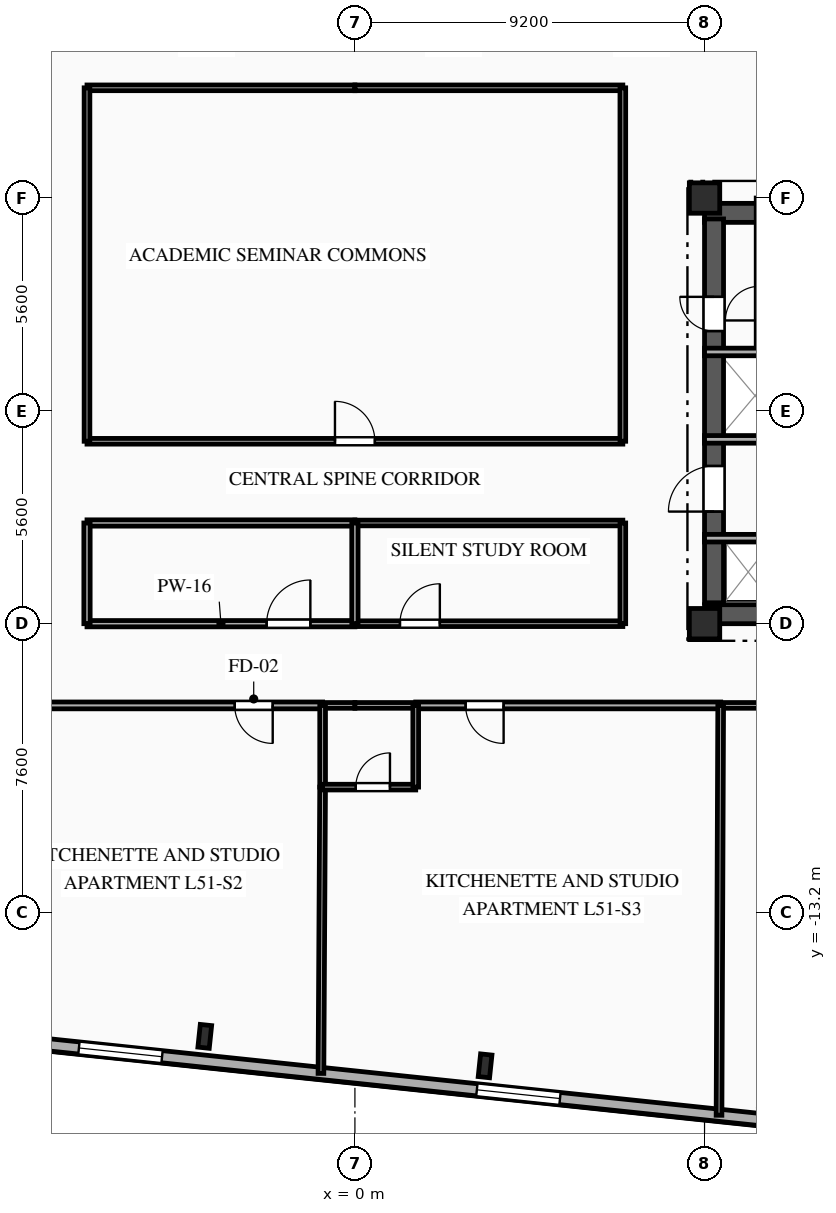
"""IFC4 building model, lengths in metres.
Left out: names, types, materials, properties, quantities, classifications, styles, units other than length and angle.
Written with IfcOpenShell. Run it as: python <this file> out.ifc"""

import sys

from ifc_helpers import new_model, si_unit, direction, frame, frame_2d, origin, origin_2d, place, context, subcontext, project, spatial, rectangle, i_section, extrude, element, fill, save


model = new_model("IFC4")
c1 = context("Model", 3, precision=1e-05, world=origin(), true_north=direction((0.0, 1.0)))
c2 = subcontext(c1, "Body", "Model", "MODEL_VIEW")
j1 = project(units=[si_unit("LENGTHUNIT", "METRE"), si_unit("PLANEANGLEUNIT", "RADIAN")], contexts=[c1])
p1 = place(None, origin())
s1 = spatial("IfcSite", under=j1, at=p1, CompositionType="ELEMENT")
p2 = place(p1, origin())
s2 = spatial("IfcBuilding", under=s1, at=p2, CompositionType="ELEMENT")
p3 = place(p2, frame((0.0, 0.0, 183.0)))
s3 = spatial("IfcBuildingStorey", under=s2, at=p3, CompositionType="ELEMENT", Elevation=183.0)
for number, where, z_axis, x_axis in (
    (1, (9.2, -5.6, 0.0), (0.0, 0.0, 1.0), (1.0, 0.0, 0.0)),
    (2, (9.2, 5.6, 0.0), (0.0, 0.0, 1.0), (1.0, 0.0, 0.0)),
):
    element("IfcColumn", number, at=place(p3, frame(where, z_axis=z_axis, x_axis=x_axis)), inside=s3, PredefinedType="COLUMN", context=c2, shape_type="SweptSolid", body=[
        extrude(rectangle(XDim=0.8, YDim=0.8, at=origin_2d()), origin(), (0.0, 0.0, 1.0), 3.35),
    ])
for number, where, z_axis, x_axis in (
    (3, (-3.951, -16.458, 0.0), (0.0, 0.0, 1.0), (0.995, -0.105, 0.0)),
    (4, (3.425, -17.233, 0.0), (0.0, 0.0, 1.0), (0.995, -0.105, 0.0)),
):
    element("IfcColumn", number, at=place(p3, frame(where, z_axis=z_axis, x_axis=x_axis)), inside=s3, PredefinedType="COLUMN", context=c2, shape_type="SweptSolid", body=[
        extrude(i_section(OverallWidth=0.3, OverallDepth=0.6, WebThickness=0.015, FlangeThickness=0.03, FilletRadius=0.027, at=origin_2d()), origin(), (0.0, 0.0, 1.0), 3.35),
    ])
p4 = place(p3, frame((18.756, -19.498, 0.0), z_axis=(0.0, 0.0, 1.0), x_axis=(-0.994522060044, 0.104526896475, 0.0)))
e5 = element("IfcWall", 5, at=p4, inside=s3, PredefinedType="SOLIDWALL", context=c2, shape_type="SweptSolid", body=[
    extrude(rectangle(XDim=45.8, YDim=0.32, at=frame_2d((22.9, 0.0))), origin(), (0.0, 0.0, 1.0), 3.04),
])
p5 = place(p4, frame((1.217, 0.0, 0.85)))
e6 = element("IfcOpeningElement", 6, at=p5, cuts=e5, PredefinedType="OPENING", context=c2, shape_type="SweptSolid", body=[
    extrude(rectangle(XDim=1.65, YDim=1.85, at=frame_2d((0.825, 0.925))), frame((0.0, 0.17, 0.0), z_axis=(0.0, -1.0, 0.0), x_axis=(1.0, 0.0, 0.0)), (0.0, 0.0, 1.0), 0.34),
])
p6 = place(p4, frame((5.621, 0.0, 0.85)))
e7 = element("IfcOpeningElement", 7, at=p6, cuts=e5, PredefinedType="OPENING", context=c2, shape_type="SweptSolid", body=[
    extrude(rectangle(XDim=1.65, YDim=1.85, at=frame_2d((0.825, 0.925))), frame((0.0, 0.17, 0.0), z_axis=(0.0, -1.0, 0.0), x_axis=(1.0, 0.0, 0.0)), (0.0, 0.0, 1.0), 0.34),
])
p7 = place(p4, frame((13.433, 0.0, 0.85)))
e8 = element("IfcOpeningElement", 8, at=p7, cuts=e5, PredefinedType="OPENING", context=c2, shape_type="SweptSolid", body=[
    extrude(rectangle(XDim=2.2, YDim=1.85, at=frame_2d((1.1, 0.925))), frame((0.0, 0.17, 0.0), z_axis=(0.0, -1.0, 0.0), x_axis=(1.0, 0.0, 0.0)), (0.0, 0.0, 1.0), 0.34),
])
p8 = place(p4, frame((23.962, 0.0, 0.85)))
e9 = element("IfcOpeningElement", 9, at=p8, cuts=e5, PredefinedType="OPENING", context=c2, shape_type="SweptSolid", body=[
    extrude(rectangle(XDim=2.2, YDim=1.85, at=frame_2d((1.1, 0.925))), frame((0.0, 0.17, 0.0), z_axis=(0.0, -1.0, 0.0), x_axis=(1.0, 0.0, 0.0)), (0.0, 0.0, 1.0), 0.34),
])
p9 = place(p4, frame((34.366, 0.0, 0.85)))
e10 = element("IfcOpeningElement", 10, at=p9, cuts=e5, PredefinedType="OPENING", context=c2, shape_type="SweptSolid", body=[
    extrude(rectangle(XDim=1.65, YDim=1.85, at=frame_2d((0.825, 0.925))), frame((0.0, 0.17, 0.0), z_axis=(0.0, -1.0, 0.0), x_axis=(1.0, 0.0, 0.0)), (0.0, 0.0, 1.0), 0.34),
])
p10 = place(p4, frame((41.892, 0.0, 0.85)))
e11 = element("IfcOpeningElement", 11, at=p10, cuts=e5, PredefinedType="OPENING", context=c2, shape_type="SweptSolid", body=[
    extrude(rectangle(XDim=1.65, YDim=1.85, at=frame_2d((0.825, 0.925))), frame((0.0, 0.17, 0.0), z_axis=(0.0, -1.0, 0.0), x_axis=(1.0, 0.0, 0.0)), (0.0, 0.0, 1.0), 0.34),
])
p11 = place(p3, frame((9.2, 5.21, 0.0), z_axis=(0.0, 0.0, 1.0), x_axis=(1.0, 0.0, 0.0)))
e12 = element("IfcWall", 12, at=p11, inside=s3, PredefinedType="SHEAR", context=c2, shape_type="SweptSolid", body=[
    extrude(rectangle(XDim=9.6, YDim=0.5, at=frame_2d((4.8, 0.0))), origin(), (0.0, 0.0, 1.0), 3.04),
])
p12 = place(p11, frame((6.95, 0.0, 0.0)))
e13 = element("IfcOpeningElement", 13, at=p12, cuts=e12, PredefinedType="OPENING", context=c2, shape_type="SweptSolid", body=[
    extrude(rectangle(XDim=1.1, YDim=2.15, at=frame_2d((0.55, 1.075))), frame((0.0, 0.26, 0.0), z_axis=(0.0, -1.0, 0.0), x_axis=(1.0, 0.0, 0.0)), (0.0, 0.0, 1.0), 0.52),
])
p13 = place(p11, frame((3.775, 0.0, 0.0)))
e14 = element("IfcOpeningElement", 14, at=p13, cuts=e12, PredefinedType="OPENING", context=c2, shape_type="SweptSolid", body=[
    extrude(rectangle(XDim=1.05, YDim=2.1, at=frame_2d((0.525, 1.05))), frame((0.0, 0.26, 0.0), z_axis=(0.0, -1.0, 0.0), x_axis=(1.0, 0.0, 0.0)), (0.0, 0.0, 1.0), 0.52),
])
p14 = place(p3, frame((9.2, -5.35, 0.0), z_axis=(0.0, 0.0, 1.0), x_axis=(1.0, 0.0, 0.0)))
e15 = element("IfcWall", 15, at=p14, inside=s3, PredefinedType="SHEAR", context=c2, shape_type="SweptSolid", body=[
    extrude(rectangle(XDim=9.6, YDim=0.5, at=frame_2d((4.8, 0.0))), origin(), (0.0, 0.0, 1.0), 3.04),
])
p15 = place(p14, frame((7.65, 0.0, 0.0)))
e16 = element("IfcOpeningElement", 16, at=p15, cuts=e15, PredefinedType="OPENING", context=c2, shape_type="SweptSolid", body=[
    extrude(rectangle(XDim=0.9, YDim=2.1, at=frame_2d((0.45, 1.05))), frame((0.0, 0.26, 0.0), z_axis=(0.0, -1.0, 0.0), x_axis=(1.0, 0.0, 0.0)), (0.0, 0.0, 1.0), 0.52),
])
p16 = place(p3, frame((9.45, -5.05, 0.0), z_axis=(0.0, 0.0, 1.0), x_axis=(0.0, 1.0, 0.0)))
e17 = element("IfcWall", 17, at=p16, inside=s3, PredefinedType="SHEAR", context=c2, shape_type="SweptSolid", body=[
    extrude(rectangle(XDim=10.1, YDim=0.5, at=frame_2d((5.05, 0.0))), origin(), (0.0, 0.0, 1.0), 3.04),
])
p17 = place(p16, frame((7.15, 0.0, 0.0)))
e18 = element("IfcOpeningElement", 18, at=p17, cuts=e17, PredefinedType="OPENING", context=c2, shape_type="SweptSolid", body=[
    extrude(rectangle(XDim=0.9, YDim=2.1, at=frame_2d((0.45, 1.05))), frame((0.0, 0.26, 0.0), z_axis=(0.0, -1.0, 0.0), x_axis=(1.0, 0.0, 0.0)), (0.0, 0.0, 1.0), 0.52),
])
p18 = place(p16, frame((2.4, 0.0, 0.0)))
e19 = element("IfcOpeningElement", 19, at=p18, cuts=e17, PredefinedType="OPENING", context=c2, shape_type="SweptSolid", body=[
    extrude(rectangle(XDim=1.2, YDim=2.15, at=frame_2d((0.6, 1.075))), frame((0.0, 0.26, 0.0), z_axis=(0.0, -1.0, 0.0), x_axis=(1.0, 0.0, 0.0)), (0.0, 0.0, 1.0), 0.52),
])
p19 = place(p3, frame((9.2, -3.35, 0.0), z_axis=(0.0, 0.0, 1.0), x_axis=(1.0, 0.0, 0.0)))
e20 = element("IfcWall", 20, at=p19, inside=s3, PredefinedType="PARTITIONING", context=c2, shape_type="SweptSolid", body=[
    extrude(rectangle(XDim=1.88, YDim=0.2, at=frame_2d((0.94, 0.0))), origin(), (0.0, 0.0, 1.0), 2.755),
])
p20 = place(p3, frame((11.46, -0.75, 0.0), z_axis=(0.0, 0.0, 1.0), x_axis=(-1.0, 0.0, 0.0)))
e21 = element("IfcWall", 21, at=p20, inside=s3, PredefinedType="PARTITIONING", context=c2, shape_type="SweptSolid", body=[
    extrude(rectangle(XDim=2.26, YDim=0.2, at=frame_2d((1.13, 0.0))), origin(), (0.0, 0.0, 1.0), 3.04),
])
for number, where, z_axis, x_axis in (
    (22, (0.0, 8.5, 0.0), (0.0, 0.0, 1.0), (-1.0, 0.0, 0.0)),
    (23, (7.05, 8.5, 0.0), (0.0, 0.0, 1.0), (-1.0, 0.0, 0.0)),
):
    element("IfcWall", number, at=place(p3, frame(where, z_axis=z_axis, x_axis=x_axis)), inside=s3, PredefinedType="PARTITIONING", context=c2, shape_type="SweptSolid", body=[
        extrude(rectangle(XDim=7.05, YDim=0.15, at=frame_2d((3.525, 0.0))), origin(), (0.0, 0.0, 1.0), 3.04),
    ])
p21 = place(p3, frame((-0.85, -7.75, 0.0), z_axis=(0.0, 0.0, 1.0), x_axis=(-1.0, 0.0, 0.0)))
e24 = element("IfcWall", 24, at=p21, inside=s3, PredefinedType="PARTITIONING", context=c2, shape_type="SweptSolid", body=[
    extrude(rectangle(XDim=8.025, YDim=0.18, at=frame_2d((4.012, 0.0))), origin(), (0.0, 0.0, 1.0), 3.04),
])
p22 = place(p21, frame((1.313, 0.0, 0.0)))
e25 = element("IfcOpeningElement", 25, at=p22, cuts=e24, PredefinedType="OPENING", context=c2, shape_type="SweptSolid", body=[
    extrude(rectangle(XDim=1.0, YDim=2.15, at=frame_2d((0.5, 1.075))), frame((0.0, 0.1, 0.0), z_axis=(0.0, -1.0, 0.0), x_axis=(1.0, 0.0, 0.0)), (0.0, 0.0, 1.0), 0.2),
])
p23 = place(p3, frame((0.0, -7.75, 0.0), z_axis=(0.0, 0.0, 1.0), x_axis=(-1.0, 0.0, 0.0)))
e26 = element("IfcWall", 26, at=p23, inside=s3, PredefinedType="PLUMBINGWALL", context=c2, shape_type="SweptSolid", body=[
    extrude(rectangle(XDim=0.85, YDim=0.15, at=frame_2d((0.425, 0.0))), origin(), (0.0, 0.0, 1.0), 3.04),
])
p24 = place(p3, frame((-7.05, -5.6, 0.0), z_axis=(0.0, 0.0, 1.0), x_axis=(1.0, 0.0, 0.0)))
e27 = element("IfcWall", 27, at=p24, inside=s3, PredefinedType="PARTITIONING", context=c2, shape_type="SweptSolid", body=[
    extrude(rectangle(XDim=7.05, YDim=0.165, at=frame_2d((3.525, 0.0))), origin(), (0.0, 0.0, 1.0), 2.525),
])
p25 = place(p24, frame((4.728, 0.0, 0.0)))
e28 = element("IfcOpeningElement", 28, at=p25, cuts=e27, PredefinedType="OPENING", context=c2, shape_type="SweptSolid", body=[
    extrude(rectangle(XDim=1.15, YDim=2.15, at=frame_2d((0.575, 1.075))), frame((0.0, 0.093, 0.0), z_axis=(0.0, -1.0, 0.0), x_axis=(1.0, 0.0, 0.0)), (0.0, 0.0, 1.0), 0.185),
])
p26 = place(p3, frame((9.625, -7.75, 0.0), z_axis=(0.0, 0.0, 1.0), x_axis=(-1.0, 0.0, 0.0)))
e29 = element("IfcWall", 29, at=p26, inside=s3, PredefinedType="PARTITIONING", context=c2, shape_type="SweptSolid", body=[
    extrude(rectangle(XDim=8.025, YDim=0.18, at=frame_2d((4.012, 0.0))), origin(), (0.0, 0.0, 1.0), 3.04),
])
p27 = place(p26, frame((5.712, 0.0, 0.0)))
e30 = element("IfcOpeningElement", 30, at=p27, cuts=e29, PredefinedType="OPENING", context=c2, shape_type="SweptSolid", body=[
    extrude(rectangle(XDim=1.0, YDim=2.15, at=frame_2d((0.5, 1.075))), frame((0.0, 0.1, 0.0), z_axis=(0.0, -1.0, 0.0), x_axis=(1.0, 0.0, 0.0)), (0.0, 0.0, 1.0), 0.2),
])
p28 = place(p3, frame((1.6, -7.75, 0.0), z_axis=(0.0, 0.0, 1.0), x_axis=(-1.0, 0.0, 0.0)))
e31 = element("IfcWall", 31, at=p28, inside=s3, PredefinedType="PLUMBINGWALL", context=c2, shape_type="SweptSolid", body=[
    extrude(rectangle(XDim=1.6, YDim=0.15, at=frame_2d((0.8, 0.0))), origin(), (0.0, 0.0, 1.0), 3.04),
])
p29 = place(p3, frame((15.288, -7.75, 0.0), z_axis=(0.0, 0.0, 1.0), x_axis=(-1.0, 0.0, 0.0)))
e32 = element("IfcWall", 32, at=p29, inside=s3, PredefinedType="PARTITIONING", context=c2, shape_type="SweptSolid", body=[
    extrude(rectangle(XDim=5.663, YDim=0.15, at=frame_2d((2.831, 0.0))), origin(), (0.0, 0.0, 1.0), 3.04),
])
p30 = place(p29, frame((1.012, 0.0, 0.0)))
e33 = element("IfcOpeningElement", 33, at=p30, cuts=e32, PredefinedType="OPENING", context=c2, shape_type="SweptSolid", body=[
    extrude(rectangle(XDim=1.05, YDim=2.15, at=frame_2d((0.525, 1.075))), frame((0.0, 0.085, 0.0), z_axis=(0.0, -1.0, 0.0), x_axis=(1.0, 0.0, 0.0)), (0.0, 0.0, 1.0), 0.17),
])
p31 = place(p3, frame((0.0, -5.6, 0.0), z_axis=(0.0, 0.0, 1.0), x_axis=(1.0, 0.0, 0.0)))
e34 = element("IfcWall", 34, at=p31, inside=s3, PredefinedType="PARTITIONING", context=c2, shape_type="SweptSolid", body=[
    extrude(rectangle(XDim=7.05, YDim=0.15, at=frame_2d((3.525, 0.0))), origin(), (0.0, 0.0, 1.0), 2.525),
])
p32 = place(p31, frame((1.185, 0.0, 0.0)))
e35 = element("IfcOpeningElement", 35, at=p32, cuts=e34, PredefinedType="OPENING", context=c2, shape_type="SweptSolid", body=[
    extrude(rectangle(XDim=1.05, YDim=2.15, at=frame_2d((0.525, 1.075))), frame((0.0, 0.085, 0.0), z_axis=(0.0, -1.0, 0.0), x_axis=(1.0, 0.0, 0.0)), (0.0, 0.0, 1.0), 0.17),
])
p33 = place(p3, frame((-7.05, -0.8, 0.0), z_axis=(0.0, 0.0, 1.0), x_axis=(1.0, 0.0, 0.0)))
e36 = element("IfcWall", 36, at=p33, inside=s3, PredefinedType="PARTITIONING", context=c2, shape_type="SweptSolid", body=[
    extrude(rectangle(XDim=14.1, YDim=0.15, at=frame_2d((7.05, 0.0))), origin(), (0.0, 0.0, 1.0), 3.04),
])
p34 = place(p33, frame((6.525, 0.0, 0.0)))
e37 = element("IfcOpeningElement", 37, at=p34, cuts=e36, PredefinedType="OPENING", context=c2, shape_type="SweptSolid", body=[
    extrude(rectangle(XDim=1.05, YDim=2.15, at=frame_2d((0.525, 1.075))), frame((0.0, 0.085, 0.0), z_axis=(0.0, -1.0, 0.0), x_axis=(1.0, 0.0, 0.0)), (0.0, 0.0, 1.0), 0.17),
])
p35 = place(p3, frame((0.0, -2.95, 0.0), z_axis=(0.0, 0.0, 1.0), x_axis=(-1.0, 0.0, 0.0)))
e38 = element("IfcWall", 38, at=p35, inside=s3, PredefinedType="PARTITIONING", context=c2, shape_type="SweptSolid", body=[
    extrude(rectangle(XDim=7.05, YDim=0.165, at=frame_2d((3.525, 0.0))), origin(), (0.0, 0.0, 1.0), 3.04),
])
p36 = place(p3, frame((7.05, -2.95, 0.0), z_axis=(0.0, 0.0, 1.0), x_axis=(-1.0, 0.0, 0.0)))
e39 = element("IfcWall", 39, at=p36, inside=s3, PredefinedType="PARTITIONING", context=c2, shape_type="SweptSolid", body=[
    extrude(rectangle(XDim=7.05, YDim=0.15, at=frame_2d((3.525, 0.0))), origin(), (0.0, 0.0, 1.0), 3.04),
])
p37 = place(p3, frame((-7.05, 8.5, 0.0), z_axis=(0.0, 0.0, 1.0), x_axis=(0.0, -1.0, 0.0)))
e40 = element("IfcWall", 40, at=p37, inside=s3, PredefinedType="PARTITIONING", context=c2, shape_type="SweptSolid", body=[
    extrude(rectangle(XDim=9.3, YDim=0.15, at=frame_2d((4.65, 0.0))), origin(), (0.0, 0.0, 1.0), 3.04),
])
p38 = place(p3, frame((-7.05, -2.95, 0.0), z_axis=(0.0, 0.0, 1.0), x_axis=(0.0, -1.0, 0.0)))
e41 = element("IfcWall", 41, at=p38, inside=s3, PredefinedType="PARTITIONING", context=c2, shape_type="SweptSolid", body=[
    extrude(rectangle(XDim=2.65, YDim=0.165, at=frame_2d((1.325, 0.0))), origin(), (0.0, 0.0, 1.0), 3.04),
])
p39 = place(p3, frame((7.05, -0.8, 0.0), z_axis=(0.0, 0.0, 1.0), x_axis=(0.0, 1.0, 0.0)))
e42 = element("IfcWall", 42, at=p39, inside=s3, PredefinedType="PARTITIONING", context=c2, shape_type="SweptSolid", body=[
    extrude(rectangle(XDim=9.3, YDim=0.15, at=frame_2d((4.65, 0.0))), origin(), (0.0, 0.0, 1.0), 3.04),
])
p40 = place(p3, frame((7.05, -5.6, 0.0), z_axis=(0.0, 0.0, 1.0), x_axis=(0.0, 1.0, 0.0)))
e43 = element("IfcWall", 43, at=p40, inside=s3, PredefinedType="PARTITIONING", context=c2, shape_type="SweptSolid", body=[
    extrude(rectangle(XDim=2.65, YDim=0.15, at=frame_2d((1.325, 0.0))), origin(), (0.0, 0.0, 1.0), 3.04),
])
p41 = place(p3, frame((-0.85, -9.9, 0.0), z_axis=(0.0, 0.0, 1.0), x_axis=(-0.005801043172, -0.999983173807, 0.0)))
e44 = element("IfcWall", 44, at=p41, inside=s3, PredefinedType="PARTITIONING", context=c2, shape_type="SweptSolid", body=[
    extrude(rectangle(XDim=7.533, YDim=0.15, at=frame_2d((3.767, 0.0))), origin(), (0.0, 0.0, 1.0), 3.04),
])
p42 = place(p3, frame((-0.85, -7.75, 0.0), z_axis=(0.0, 0.0, 1.0), x_axis=(0.0, -1.0, 0.0)))
e45 = element("IfcWall", 45, at=p42, inside=s3, PredefinedType="PLUMBINGWALL", context=c2, shape_type="SweptSolid", body=[
    extrude(rectangle(XDim=2.15, YDim=0.15, at=frame_2d((1.075, 0.0))), origin(), (0.0, 0.0, 1.0), 3.04),
])
p43 = place(p3, frame((-0.85, -9.9, 0.0), z_axis=(0.0, 0.0, 1.0), x_axis=(1.0, 0.0, 0.0)))
e46 = element("IfcWall", 46, at=p43, inside=s3, PredefinedType="PLUMBINGWALL", context=c2, shape_type="SweptSolid", body=[
    extrude(rectangle(XDim=2.45, YDim=0.15, at=frame_2d((1.225, 0.0))), origin(), (0.0, 0.0, 1.0), 3.04),
])
p44 = place(p43, frame((0.873, 0.0, 0.0)))
e47 = element("IfcOpeningElement", 47, at=p44, cuts=e46, PredefinedType="OPENING", context=c2, shape_type="SweptSolid", body=[
    extrude(rectangle(XDim=0.9, YDim=2.1, at=frame_2d((0.45, 1.05))), frame((0.0, 0.085, 0.0), z_axis=(0.0, -1.0, 0.0), x_axis=(1.0, 0.0, 0.0)), (0.0, 0.0, 1.0), 0.17),
])
p45 = place(p3, frame((1.6, -9.9, 0.0), z_axis=(0.0, 0.0, 1.0), x_axis=(0.0, 1.0, 0.0)))
e48 = element("IfcWall", 48, at=p45, inside=s3, PredefinedType="PLUMBINGWALL", context=c2, shape_type="SweptSolid", body=[
    extrude(rectangle(XDim=2.15, YDim=0.15, at=frame_2d((1.075, 0.0))), origin(), (0.0, 0.0, 1.0), 3.04),
])
p46 = place(p3, frame((9.625, -7.75, 0.0), z_axis=(0.0, 0.0, 1.0), x_axis=(-0.004074945792, -0.999991697374, 0.0)))
e49 = element("IfcWall", 49, at=p46, inside=s3, PredefinedType="PARTITIONING", context=c2, shape_type="SweptSolid", body=[
    extrude(rectangle(XDim=10.784, YDim=0.15, at=frame_2d((5.392, 0.0))), origin(), (0.0, 0.0, 1.0), 3.04),
])
p47 = place(p3, frame((0.0, -2.95, 0.0), z_axis=(0.0, 0.0, 1.0), x_axis=(0.0, -1.0, 0.0)))
e50 = element("IfcWall", 50, at=p47, inside=s3, PredefinedType="PARTITIONING", context=c2, shape_type="SweptSolid", body=[
    extrude(rectangle(XDim=2.65, YDim=0.165, at=frame_2d((1.325, 0.0))), origin(), (0.0, 0.0, 1.0), 3.04),
])
p48 = place(p3, frame((9.2, 1.55, 0.0), z_axis=(0.0, 0.0, 1.0), x_axis=(1.0, 0.0, 0.0)))
e51 = element("IfcWall", 51, at=p48, inside=s3, PredefinedType="PARTITIONING", context=c2, shape_type="SweptSolid", body=[
    extrude(rectangle(XDim=5.82, YDim=0.2, at=frame_2d((2.91, 0.0))), origin(), (0.0, 0.0, 1.0), 3.04),
])
p49 = place(p7, origin())
e52 = element("IfcWindow", 52, at=p49, inside=s3, PartitioningType="SINGLE_PANEL", PredefinedType="WINDOW", context=c2, shape_type="SweptSolid", body=[
    extrude(rectangle(XDim=2.2, YDim=1.85, at=frame_2d((1.1, 0.925))), frame((0.0, 0.03, 0.0), z_axis=(0.0, -1.0, 0.0), x_axis=(1.0, 0.0, 0.0)), (0.0, 0.0, 1.0), 0.06),
])
fill(e8, e52)
p50 = place(p8, origin())
e53 = element("IfcWindow", 53, at=p50, inside=s3, PartitioningType="SINGLE_PANEL", PredefinedType="WINDOW", context=c2, shape_type="SweptSolid", body=[
    extrude(rectangle(XDim=2.2, YDim=1.85, at=frame_2d((1.1, 0.925))), frame((0.0, 0.03, 0.0), z_axis=(0.0, -1.0, 0.0), x_axis=(1.0, 0.0, 0.0)), (0.0, 0.0, 1.0), 0.06),
])
fill(e9, e53)
p51 = place(p17, origin())
e54 = element("IfcDoor", 54, at=p51, inside=s3, OperationType="SINGLE_SWING_RIGHT", PredefinedType="DOOR", context=c2, shape_type="SweptSolid", body=[
    extrude(rectangle(XDim=0.9, YDim=2.1, at=frame_2d((0.45, 1.05))), frame((0.0, 0.025, 0.0), z_axis=(0.0, -1.0, 0.0), x_axis=(1.0, 0.0, 0.0)), (0.0, 0.0, 1.0), 0.05),
])
fill(e18, e54)
p52 = place(p18, origin())
e55 = element("IfcDoor", 55, at=p52, inside=s3, OperationType="SINGLE_SWING_LEFT", PredefinedType="DOOR", context=c2, shape_type="SweptSolid", body=[
    extrude(rectangle(XDim=1.2, YDim=2.15, at=frame_2d((0.6, 1.075))), frame((0.0, 0.025, 0.0), z_axis=(0.0, -1.0, 0.0), x_axis=(1.0, 0.0, 0.0)), (0.0, 0.0, 1.0), 0.05),
])
fill(e19, e55)
p53 = place(p22, origin())
e56 = element("IfcDoor", 56, at=p53, inside=s3, OperationType="SINGLE_SWING_LEFT", PredefinedType="DOOR", context=c2, shape_type="SweptSolid", body=[
    extrude(rectangle(XDim=1.0, YDim=2.15, at=frame_2d((0.5, 1.075))), frame((0.0, 0.025, 0.0), z_axis=(0.0, -1.0, 0.0), x_axis=(1.0, 0.0, 0.0)), (0.0, 0.0, 1.0), 0.05),
])
fill(e25, e56)
p54 = place(p25, origin())
e57 = element("IfcDoor", 57, at=p54, inside=s3, OperationType="SINGLE_SWING_RIGHT", PredefinedType="DOOR", context=c2, shape_type="SweptSolid", body=[
    extrude(rectangle(XDim=1.15, YDim=2.15, at=frame_2d((0.575, 1.075))), frame((0.0, 0.025, 0.0), z_axis=(0.0, -1.0, 0.0), x_axis=(1.0, 0.0, 0.0)), (0.0, 0.0, 1.0), 0.05),
])
fill(e28, e57)
p55 = place(p27, origin())
e58 = element("IfcDoor", 58, at=p55, inside=s3, OperationType="SINGLE_SWING_LEFT", PredefinedType="DOOR", context=c2, shape_type="SweptSolid", body=[
    extrude(rectangle(XDim=1.0, YDim=2.15, at=frame_2d((0.5, 1.075))), frame((0.0, 0.025, 0.0), z_axis=(0.0, -1.0, 0.0), x_axis=(1.0, 0.0, 0.0)), (0.0, 0.0, 1.0), 0.05),
])
fill(e30, e58)
p56 = place(p32, origin())
e59 = element("IfcDoor", 59, at=p56, inside=s3, OperationType="SINGLE_SWING_RIGHT", PredefinedType="DOOR", context=c2, shape_type="SweptSolid", body=[
    extrude(rectangle(XDim=1.05, YDim=2.15, at=frame_2d((0.525, 1.075))), frame((0.0, 0.025, 0.0), z_axis=(0.0, -1.0, 0.0), x_axis=(1.0, 0.0, 0.0)), (0.0, 0.0, 1.0), 0.05),
])
fill(e35, e59)
p57 = place(p34, origin())
e60 = element("IfcDoor", 60, at=p57, inside=s3, OperationType="SINGLE_SWING_LEFT", PredefinedType="DOOR", context=c2, shape_type="SweptSolid", body=[
    extrude(rectangle(XDim=1.05, YDim=2.15, at=frame_2d((0.525, 1.075))), frame((0.0, 0.025, 0.0), z_axis=(0.0, -1.0, 0.0), x_axis=(1.0, 0.0, 0.0)), (0.0, 0.0, 1.0), 0.05),
])
fill(e37, e60)
p58 = place(p44, origin())
e61 = element("IfcDoor", 61, at=p58, inside=s3, OperationType="SINGLE_SWING_RIGHT", PredefinedType="DOOR", context=c2, shape_type="SweptSolid", body=[
    extrude(rectangle(XDim=0.9, YDim=2.1, at=frame_2d((0.45, 1.05))), frame((0.0, 0.025, 0.0), z_axis=(0.0, -1.0, 0.0), x_axis=(1.0, 0.0, 0.0)), (0.0, 0.0, 1.0), 0.05),
])
fill(e47, e61)
save(model, sys.argv[1])
